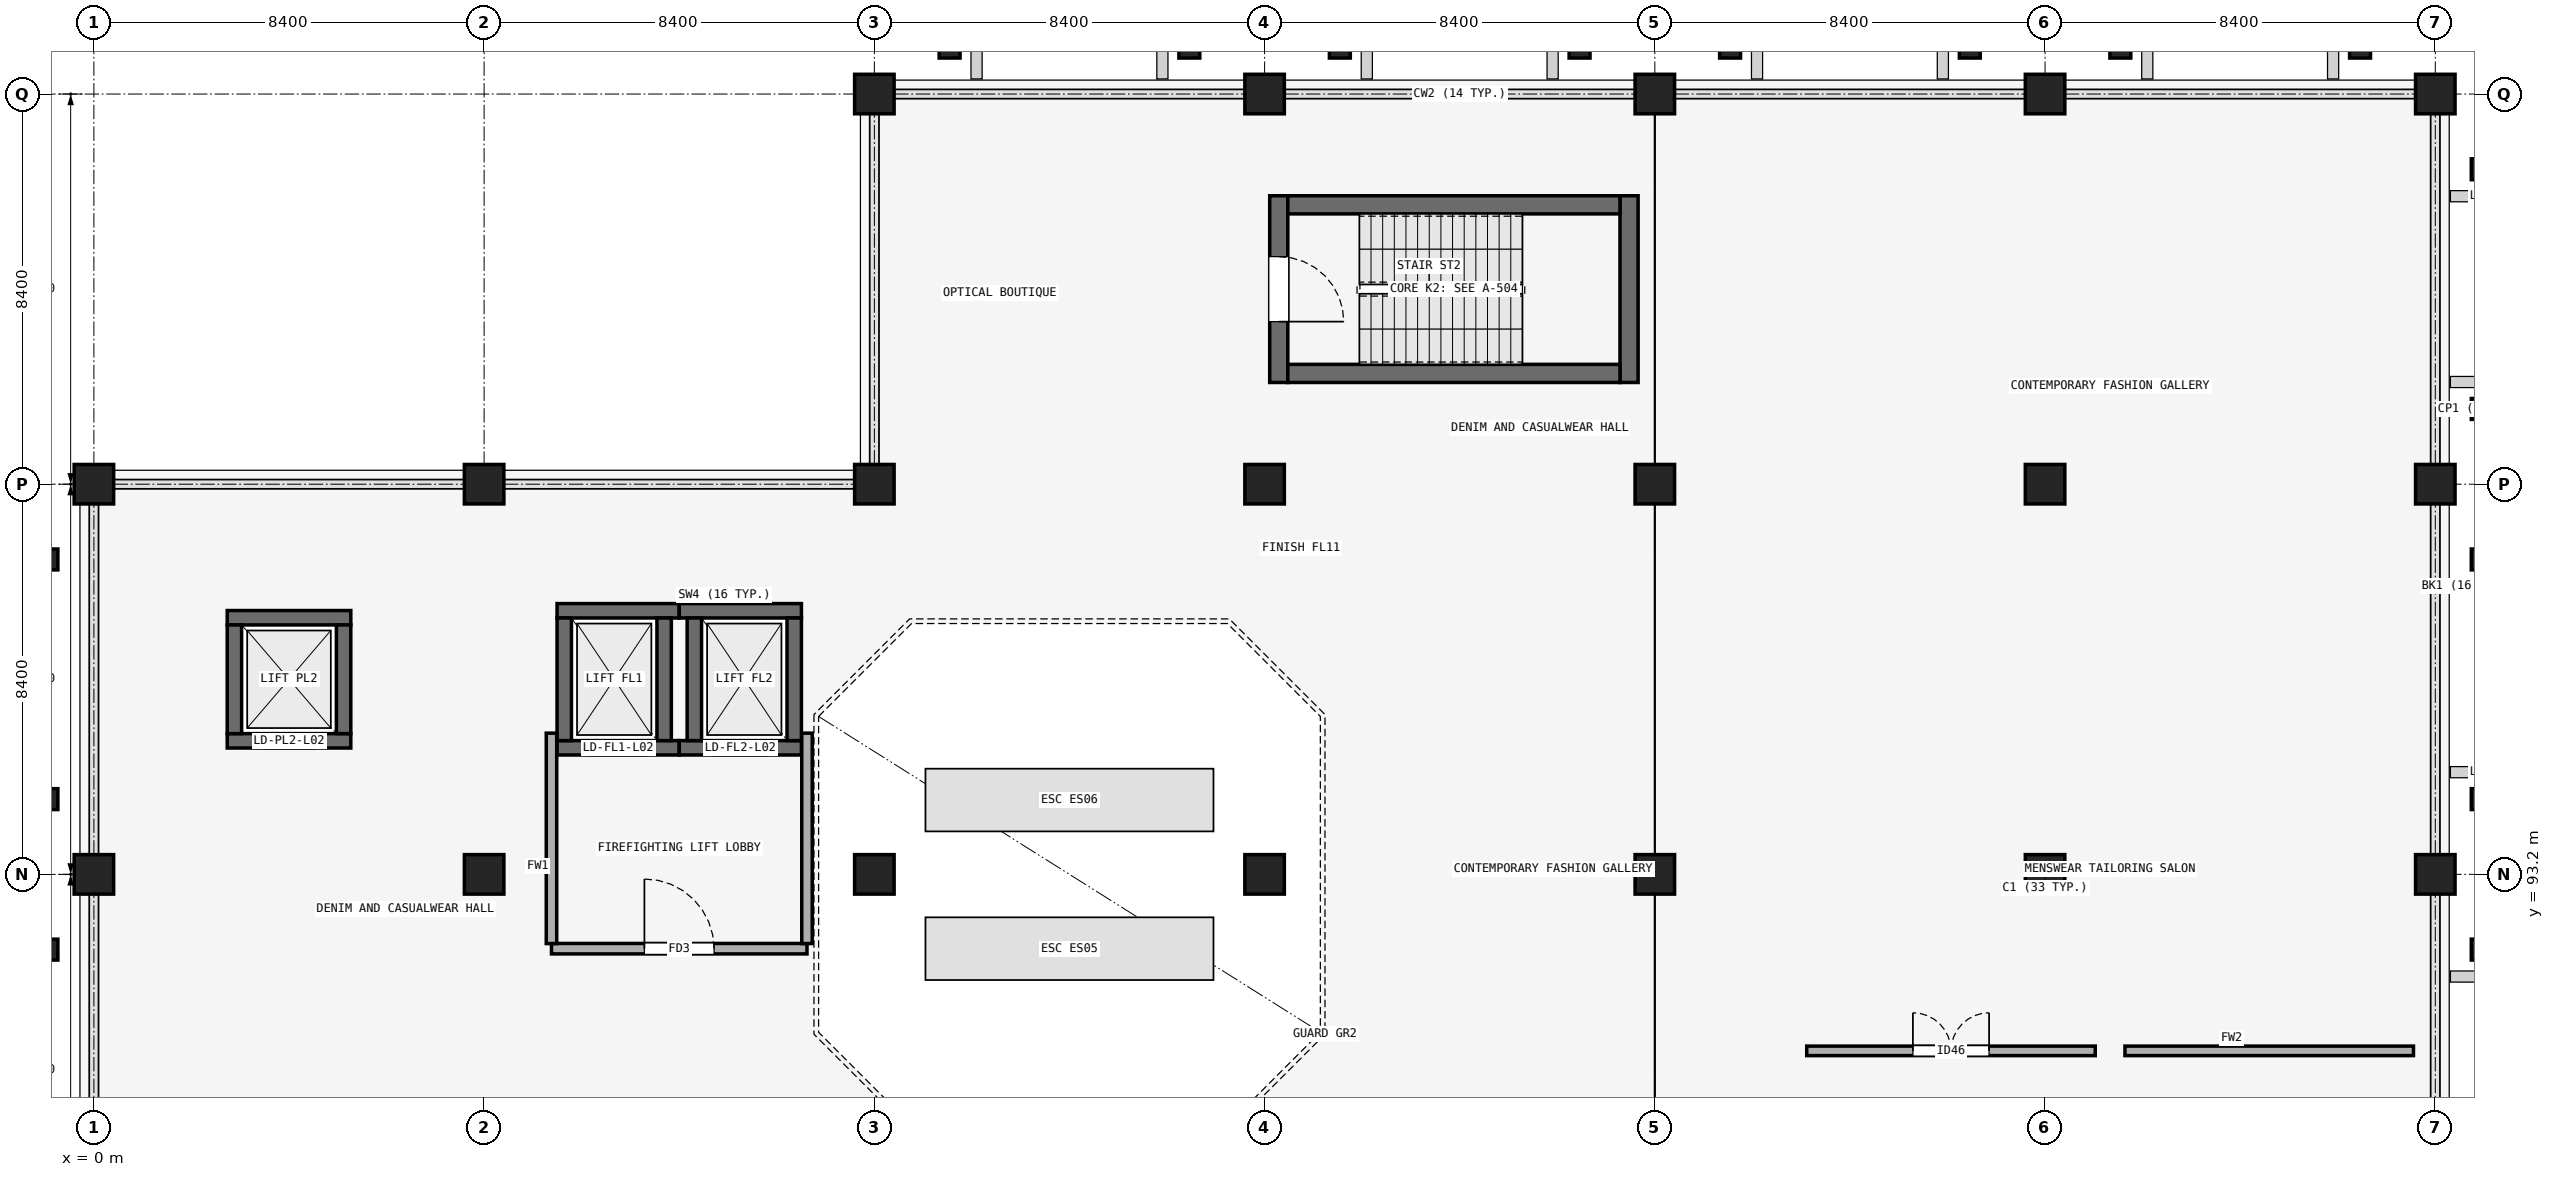
"""IFC4 building model, lengths in metres.
Left out: names, types, materials, properties, quantities, classifications, styles, units other than length and angle.
Written with IfcOpenShell. Run it as: python <this file> out.ifc"""

import sys

from ifc_helpers import new_model, si_unit, direction, frame, frame_2d, origin, origin_2d, place, context, subcontext, project, spatial, rectangle, extrude, element, fill, save


model = new_model("IFC4")
c1 = context("Model", 3, precision=1e-05, world=origin(), true_north=direction((0.0, 1.0)))
c2 = subcontext(c1, "Body", "Model", "MODEL_VIEW")
j1 = project(units=[si_unit("LENGTHUNIT", "METRE"), si_unit("PLANEANGLEUNIT", "RADIAN")], contexts=[c1])
p1 = place(None, origin())
s1 = spatial("IfcSite", under=j1, at=p1, CompositionType="ELEMENT")
p2 = place(p1, origin())
s2 = spatial("IfcBuilding", under=s1, at=p2, CompositionType="ELEMENT")
p3 = place(p2, frame((0.0, 0.0, 9.9)))
s3 = spatial("IfcBuildingStorey", under=s2, at=p3, CompositionType="ELEMENT", Elevation=9.9)
for number, where, z_axis, x_axis in (
    (1, (0.0, 93.2, 0.0), (0.0, 0.0, 1.0), (1.0, 0.0, 0.0)),
    (2, (8.4, 93.2, 0.0), (0.0, 0.0, 1.0), (1.0, 0.0, 0.0)),
    (3, (16.8, 93.2, 0.0), (0.0, 0.0, 1.0), (1.0, 0.0, 0.0)),
    (4, (25.2, 93.2, 0.0), (0.0, 0.0, 1.0), (1.0, 0.0, 0.0)),
    (5, (33.6, 93.2, 0.0), (0.0, 0.0, 1.0), (1.0, 0.0, 0.0)),
    (6, (42.0, 93.2, 0.0), (0.0, 0.0, 1.0), (1.0, 0.0, 0.0)),
    (7, (50.4, 93.2, 0.0), (0.0, 0.0, 1.0), (1.0, 0.0, 0.0)),
    (8, (0.0, 101.6, 0.0), (0.0, 0.0, 1.0), (1.0, 0.0, 0.0)),
    (9, (8.4, 101.6, 0.0), (0.0, 0.0, 1.0), (1.0, 0.0, 0.0)),
    (10, (16.8, 101.6, 0.0), (0.0, 0.0, 1.0), (1.0, 0.0, 0.0)),
    (11, (25.2, 101.6, 0.0), (0.0, 0.0, 1.0), (1.0, 0.0, 0.0)),
    (12, (33.6, 101.6, 0.0), (0.0, 0.0, 1.0), (1.0, 0.0, 0.0)),
    (13, (42.0, 101.6, 0.0), (0.0, 0.0, 1.0), (1.0, 0.0, 0.0)),
    (14, (50.4, 101.6, 0.0), (0.0, 0.0, 1.0), (1.0, 0.0, 0.0)),
    (15, (16.8, 110.0, 0.0), (0.0, 0.0, 1.0), (1.0, 0.0, 0.0)),
    (16, (25.2, 110.0, 0.0), (0.0, 0.0, 1.0), (1.0, 0.0, 0.0)),
    (17, (33.6, 110.0, 0.0), (0.0, 0.0, 1.0), (1.0, 0.0, 0.0)),
    (18, (42.0, 110.0, 0.0), (0.0, 0.0, 1.0), (1.0, 0.0, 0.0)),
    (19, (50.4, 110.0, 0.0), (0.0, 0.0, 1.0), (1.0, 0.0, 0.0)),
):
    element("IfcColumn", number, at=place(p3, frame(where, z_axis=z_axis, x_axis=x_axis)), inside=s3, PredefinedType="COLUMN", context=c2, shape_type="SweptSolid", body=[
        extrude(rectangle(XDim=0.85, YDim=0.85, at=origin_2d()), origin(), (0.0, 0.0, 1.0), 4.5),
    ])
for number, where, z_axis, x_axis in (
    (20, (18.42, 111.05, 0.0), (0.0, 0.0, 1.0), (1.0, 0.0, 0.0)),
    (21, (23.58, 111.05, 0.0), (0.0, 0.0, 1.0), (1.0, 0.0, 0.0)),
    (22, (26.82, 111.05, 0.0), (0.0, 0.0, 1.0), (1.0, 0.0, 0.0)),
    (23, (31.98, 111.05, 0.0), (0.0, 0.0, 1.0), (1.0, 0.0, 0.0)),
    (24, (35.22, 111.05, 0.0), (0.0, 0.0, 1.0), (1.0, 0.0, 0.0)),
    (25, (40.38, 111.05, 0.0), (0.0, 0.0, 1.0), (1.0, 0.0, 0.0)),
    (26, (43.62, 111.05, 0.0), (0.0, 0.0, 1.0), (1.0, 0.0, 0.0)),
    (27, (48.78, 111.05, 0.0), (0.0, 0.0, 1.0), (1.0, 0.0, 0.0)),
    (28, (-1.05, 91.58, 0.0), (0.0, 0.0, 1.0), (0.0, 1.0, 0.0)),
    (29, (-1.05, 94.82, 0.0), (0.0, 0.0, 1.0), (0.0, 1.0, 0.0)),
    (30, (-1.05, 99.98, 0.0), (0.0, 0.0, 1.0), (0.0, 1.0, 0.0)),
    (31, (51.45, 91.58, 0.0), (0.0, 0.0, 1.0), (0.0, 1.0, 0.0)),
    (32, (51.45, 94.82, 0.0), (0.0, 0.0, 1.0), (0.0, 1.0, 0.0)),
    (33, (51.45, 99.98, 0.0), (0.0, 0.0, 1.0), (0.0, 1.0, 0.0)),
    (34, (51.45, 103.22, 0.0), (0.0, 0.0, 1.0), (0.0, 1.0, 0.0)),
    (35, (51.45, 108.38, 0.0), (0.0, 0.0, 1.0), (0.0, 1.0, 0.0)),
):
    element("IfcColumn", number, at=place(p3, frame(where, z_axis=z_axis, x_axis=x_axis)), inside=s3, PredefinedType="PILASTER", context=c2, shape_type="SweptSolid", body=[
        extrude(rectangle(XDim=0.45, YDim=0.55, at=origin_2d()), origin(), (0.0, 0.0, 1.0), 4.5),
    ])
p4 = place(p3, frame((25.505, 107.81, 0.0), z_axis=(0.0, 0.0, 1.0), x_axis=(0.0, -1.0, 0.0)))
e36 = element("IfcWall", 36, at=p4, inside=s3, PredefinedType="SHEAR", context=c2, shape_type="SweptSolid", body=[
    extrude(rectangle(XDim=4.02, YDim=0.39, at=frame_2d((2.01, 0.0))), origin(), (0.0, 0.0, 1.0), 4.2),
])
p5 = place(p4, frame((1.31, 0.0, 0.0)))
e37 = element("IfcOpeningElement", 37, at=p5, cuts=e36, PredefinedType="OPENING", context=c2, shape_type="SweptSolid", body=[
    extrude(rectangle(XDim=1.4, YDim=2.15, at=frame_2d((0.7, 1.075))), frame((0.0, 0.205, 0.0), z_axis=(0.0, -1.0, 0.0), x_axis=(1.0, 0.0, 0.0)), (0.0, 0.0, 1.0), 0.41),
])
p6 = place(p3, frame((33.045, 103.79, 0.0), z_axis=(0.0, 0.0, 1.0), x_axis=(0.0, 1.0, 0.0)))
e38 = element("IfcWall", 38, at=p6, inside=s3, PredefinedType="SHEAR", context=c2, shape_type="SweptSolid", body=[
    extrude(rectangle(XDim=4.02, YDim=0.39, at=frame_2d((2.01, 0.0))), origin(), (0.0, 0.0, 1.0), 4.2),
])
for number, where, z_axis, x_axis in (
    (39, (25.7, 103.985, 0.0), (0.0, 0.0, 1.0), (1.0, 0.0, 0.0)),
    (40, (25.7, 107.615, 0.0), (0.0, 0.0, 1.0), (1.0, 0.0, 0.0)),
):
    element("IfcWall", number, at=place(p3, frame(where, z_axis=z_axis, x_axis=x_axis)), inside=s3, PredefinedType="SHEAR", context=c2, shape_type="SweptSolid", body=[
        extrude(rectangle(XDim=7.15, YDim=0.39, at=frame_2d((3.575, 0.0))), origin(), (0.0, 0.0, 1.0), 4.2),
    ])
p7 = place(p3, frame((9.97, 95.925, 0.0), z_axis=(0.0, 0.0, 1.0), x_axis=(1.0, 0.0, 0.0)))
e41 = element("IfcWall", 41, at=p7, inside=s3, PredefinedType="SHEAR", context=c2, shape_type="SweptSolid", body=[
    extrude(rectangle(XDim=2.63, YDim=0.31, at=frame_2d((1.315, 0.0))), origin(), (0.0, 0.0, 1.0), 4.2),
])
p8 = place(p7, frame((0.715, 0.0, 0.0)))
e42 = element("IfcOpeningElement", 42, at=p8, cuts=e41, PredefinedType="OPENING", context=c2, shape_type="SweptSolid", body=[
    extrude(rectangle(XDim=1.2, YDim=2.25, at=frame_2d((0.6, 1.125))), frame((0.0, 0.165, 0.0), z_axis=(0.0, -1.0, 0.0), x_axis=(1.0, 0.0, 0.0)), (0.0, 0.0, 1.0), 0.33),
])
p9 = place(p3, frame((9.97, 98.875, 0.0), z_axis=(0.0, 0.0, 1.0), x_axis=(1.0, 0.0, 0.0)))
e43 = element("IfcWall", 43, at=p9, inside=s3, PredefinedType="SHEAR", context=c2, shape_type="SweptSolid", body=[
    extrude(rectangle(XDim=2.63, YDim=0.31, at=frame_2d((1.315, 0.0))), origin(), (0.0, 0.0, 1.0), 4.2),
])
for number, where, z_axis, x_axis in (
    (44, (10.125, 96.08, 0.0), (0.0, 0.0, 1.0), (0.0, 1.0, 0.0)),
    (45, (12.275, 96.08, 0.0), (0.0, 0.0, 1.0), (0.0, 1.0, 0.0)),
):
    element("IfcWall", number, at=place(p3, frame(where, z_axis=z_axis, x_axis=x_axis)), inside=s3, PredefinedType="SHEAR", context=c2, shape_type="SweptSolid", body=[
        extrude(rectangle(XDim=2.64, YDim=0.31, at=frame_2d((1.32, 0.0))), origin(), (0.0, 0.0, 1.0), 4.2),
    ])
p10 = place(p3, frame((12.6, 95.925, 0.0), z_axis=(0.0, 0.0, 1.0), x_axis=(1.0, 0.0, 0.0)))
e46 = element("IfcWall", 46, at=p10, inside=s3, PredefinedType="SHEAR", context=c2, shape_type="SweptSolid", body=[
    extrude(rectangle(XDim=2.63, YDim=0.31, at=frame_2d((1.315, 0.0))), origin(), (0.0, 0.0, 1.0), 4.2),
])
p11 = place(p10, frame((0.715, 0.0, 0.0)))
e47 = element("IfcOpeningElement", 47, at=p11, cuts=e46, PredefinedType="OPENING", context=c2, shape_type="SweptSolid", body=[
    extrude(rectangle(XDim=1.2, YDim=2.25, at=frame_2d((0.6, 1.125))), frame((0.0, 0.165, 0.0), z_axis=(0.0, -1.0, 0.0), x_axis=(1.0, 0.0, 0.0)), (0.0, 0.0, 1.0), 0.33),
])
p12 = place(p3, frame((12.6, 98.875, 0.0), z_axis=(0.0, 0.0, 1.0), x_axis=(1.0, 0.0, 0.0)))
e48 = element("IfcWall", 48, at=p12, inside=s3, PredefinedType="SHEAR", context=c2, shape_type="SweptSolid", body=[
    extrude(rectangle(XDim=2.63, YDim=0.31, at=frame_2d((1.315, 0.0))), origin(), (0.0, 0.0, 1.0), 4.2),
])
for number, where, z_axis, x_axis in (
    (49, (12.925, 96.08, 0.0), (0.0, 0.0, 1.0), (0.0, 1.0, 0.0)),
    (50, (15.075, 96.08, 0.0), (0.0, 0.0, 1.0), (0.0, 1.0, 0.0)),
):
    element("IfcWall", number, at=place(p3, frame(where, z_axis=z_axis, x_axis=x_axis)), inside=s3, PredefinedType="SHEAR", context=c2, shape_type="SweptSolid", body=[
        extrude(rectangle(XDim=2.64, YDim=0.31, at=frame_2d((1.32, 0.0))), origin(), (0.0, 0.0, 1.0), 4.2),
    ])
p13 = place(p3, frame((2.87, 96.075, 0.0), z_axis=(0.0, 0.0, 1.0), x_axis=(1.0, 0.0, 0.0)))
e51 = element("IfcWall", 51, at=p13, inside=s3, PredefinedType="SHEAR", context=c2, shape_type="SweptSolid", body=[
    extrude(rectangle(XDim=2.66, YDim=0.31, at=frame_2d((1.33, 0.0))), origin(), (0.0, 0.0, 1.0), 4.2),
])
p14 = place(p13, frame((0.78, 0.0, 0.0)))
e52 = element("IfcOpeningElement", 52, at=p14, cuts=e51, PredefinedType="OPENING", context=c2, shape_type="SweptSolid", body=[
    extrude(rectangle(XDim=1.1, YDim=2.2, at=frame_2d((0.55, 1.1))), frame((0.0, 0.165, 0.0), z_axis=(0.0, -1.0, 0.0), x_axis=(1.0, 0.0, 0.0)), (0.0, 0.0, 1.0), 0.33),
])
p15 = place(p3, frame((2.87, 98.725, 0.0), z_axis=(0.0, 0.0, 1.0), x_axis=(1.0, 0.0, 0.0)))
e53 = element("IfcWall", 53, at=p15, inside=s3, PredefinedType="SHEAR", context=c2, shape_type="SweptSolid", body=[
    extrude(rectangle(XDim=2.66, YDim=0.31, at=frame_2d((1.33, 0.0))), origin(), (0.0, 0.0, 1.0), 4.2),
])
for number, where, z_axis, x_axis in (
    (54, (3.025, 96.23, 0.0), (0.0, 0.0, 1.0), (0.0, 1.0, 0.0)),
    (55, (5.375, 96.23, 0.0), (0.0, 0.0, 1.0), (0.0, 1.0, 0.0)),
):
    element("IfcWall", number, at=place(p3, frame(where, z_axis=z_axis, x_axis=x_axis)), inside=s3, PredefinedType="SHEAR", context=c2, shape_type="SweptSolid", body=[
        extrude(rectangle(XDim=2.34, YDim=0.31, at=frame_2d((1.17, 0.0))), origin(), (0.0, 0.0, 1.0), 4.2),
    ])
p16 = place(p3, frame((9.85, 91.6, 0.0), z_axis=(0.0, 0.0, 1.0), x_axis=(1.0, 0.0, 0.0)))
e56 = element("IfcWall", 56, at=p16, inside=s3, PredefinedType="PARTITIONING", context=c2, shape_type="SweptSolid", body=[
    extrude(rectangle(XDim=5.5, YDim=0.225, at=frame_2d((2.75, 0.0))), origin(), (0.0, 0.0, 1.0), 4.2),
])
p17 = place(p16, frame((2.0, 0.0, 0.0)))
e57 = element("IfcOpeningElement", 57, at=p17, cuts=e56, PredefinedType="OPENING", context=c2, shape_type="SweptSolid", body=[
    extrude(rectangle(XDim=1.5, YDim=2.25, at=frame_2d((0.75, 1.125))), frame((0.0, 0.123, 0.0), z_axis=(0.0, -1.0, 0.0), x_axis=(1.0, 0.0, 0.0)), (0.0, 0.0, 1.0), 0.245),
])
for number, where, z_axis, x_axis in (
    (58, (9.85, 91.71, 0.0), (0.0, 0.0, 1.0), (0.0, 1.0, 0.0)),
    (59, (15.35, 91.71, 0.0), (0.0, 0.0, 1.0), (0.0, 1.0, 0.0)),
):
    element("IfcWall", number, at=place(p3, frame(where, z_axis=z_axis, x_axis=x_axis)), inside=s3, PredefinedType="PARTITIONING", context=c2, shape_type="SweptSolid", body=[
        extrude(rectangle(XDim=4.53, YDim=0.225, at=frame_2d((2.265, 0.0))), origin(), (0.0, 0.0, 1.0), 3.5),
    ])
p18 = place(p3, frame((36.87, 89.4, 0.0), z_axis=(0.0, 0.0, 1.0), x_axis=(1.0, 0.0, 0.0)))
e60 = element("IfcWall", 60, at=p18, inside=s3, PredefinedType="PARTITIONING", context=c2, shape_type="SweptSolid", body=[
    extrude(rectangle(XDim=6.21, YDim=0.205, at=frame_2d((3.105, 0.0))), origin(), (0.0, 0.0, 1.0), 3.45),
])
p19 = place(p18, frame((2.285, 0.0, 0.0)))
e61 = element("IfcOpeningElement", 61, at=p19, cuts=e60, PredefinedType="OPENING", context=c2, shape_type="SweptSolid", body=[
    extrude(rectangle(XDim=1.64, YDim=2.46, at=frame_2d((0.82, 1.23))), frame((0.0, 0.113, 0.0), z_axis=(0.0, -1.0, 0.0), x_axis=(1.0, 0.0, 0.0)), (0.0, 0.0, 1.0), 0.225),
])
p20 = place(p3, frame((43.72, 89.4, 0.0), z_axis=(0.0, 0.0, 1.0), x_axis=(1.0, 0.0, 0.0)))
e62 = element("IfcWall", 62, at=p20, inside=s3, PredefinedType="PARTITIONING", context=c2, shape_type="SweptSolid", body=[
    extrude(rectangle(XDim=6.21, YDim=0.205, at=frame_2d((3.105, 0.0))), origin(), (0.0, 0.0, 1.0), 4.2),
])
p21 = place(p5, origin())
e63 = element("IfcDoor", 63, at=p21, inside=s3, OperationType="SINGLE_SWING_RIGHT", PredefinedType="DOOR", context=c2, shape_type="SweptSolid", body=[
    extrude(rectangle(XDim=1.4, YDim=2.15, at=frame_2d((0.7, 1.075))), frame((0.0, 0.025, 0.0), z_axis=(0.0, -1.0, 0.0), x_axis=(1.0, 0.0, 0.0)), (0.0, 0.0, 1.0), 0.05),
])
fill(e37, e63)
p22 = place(p8, origin())
e64 = element("IfcDoor", 64, at=p22, inside=s3, OperationType="SLIDING_TO_LEFT", PredefinedType="DOOR", context=c2, shape_type="SweptSolid", body=[
    extrude(rectangle(XDim=1.2, YDim=2.25, at=frame_2d((0.6, 1.125))), frame((0.0, 0.025, 0.0), z_axis=(0.0, -1.0, 0.0), x_axis=(1.0, 0.0, 0.0)), (0.0, 0.0, 1.0), 0.05),
])
fill(e42, e64)
p23 = place(p11, origin())
e65 = element("IfcDoor", 65, at=p23, inside=s3, OperationType="SLIDING_TO_LEFT", PredefinedType="DOOR", context=c2, shape_type="SweptSolid", body=[
    extrude(rectangle(XDim=1.2, YDim=2.25, at=frame_2d((0.6, 1.125))), frame((0.0, 0.025, 0.0), z_axis=(0.0, -1.0, 0.0), x_axis=(1.0, 0.0, 0.0)), (0.0, 0.0, 1.0), 0.05),
])
fill(e47, e65)
p24 = place(p14, origin())
e66 = element("IfcDoor", 66, at=p24, inside=s3, OperationType="SLIDING_TO_LEFT", PredefinedType="DOOR", context=c2, shape_type="SweptSolid", body=[
    extrude(rectangle(XDim=1.1, YDim=2.2, at=frame_2d((0.55, 1.1))), frame((0.0, 0.025, 0.0), z_axis=(0.0, -1.0, 0.0), x_axis=(1.0, 0.0, 0.0)), (0.0, 0.0, 1.0), 0.05),
])
fill(e52, e66)
p25 = place(p17, origin())
e67 = element("IfcDoor", 67, at=p25, inside=s3, OperationType="SINGLE_SWING_LEFT", PredefinedType="DOOR", context=c2, shape_type="SweptSolid", body=[
    extrude(rectangle(XDim=1.5, YDim=2.25, at=frame_2d((0.75, 1.125))), frame((0.0, 0.025, 0.0), z_axis=(0.0, -1.0, 0.0), x_axis=(1.0, 0.0, 0.0)), (0.0, 0.0, 1.0), 0.05),
])
fill(e57, e67)
p26 = place(p19, origin())
e68 = element("IfcDoor", 68, at=p26, inside=s3, OperationType="DOUBLE_DOOR_SINGLE_SWING", PredefinedType="DOOR", context=c2, shape_type="SweptSolid", body=[
    extrude(rectangle(XDim=1.64, YDim=2.46, at=frame_2d((0.82, 1.23))), frame((0.0, 0.025, 0.0), z_axis=(0.0, -1.0, 0.0), x_axis=(1.0, 0.0, 0.0)), (0.0, 0.0, 1.0), 0.05),
])
fill(e61, e68)
save(model, sys.argv[1])
